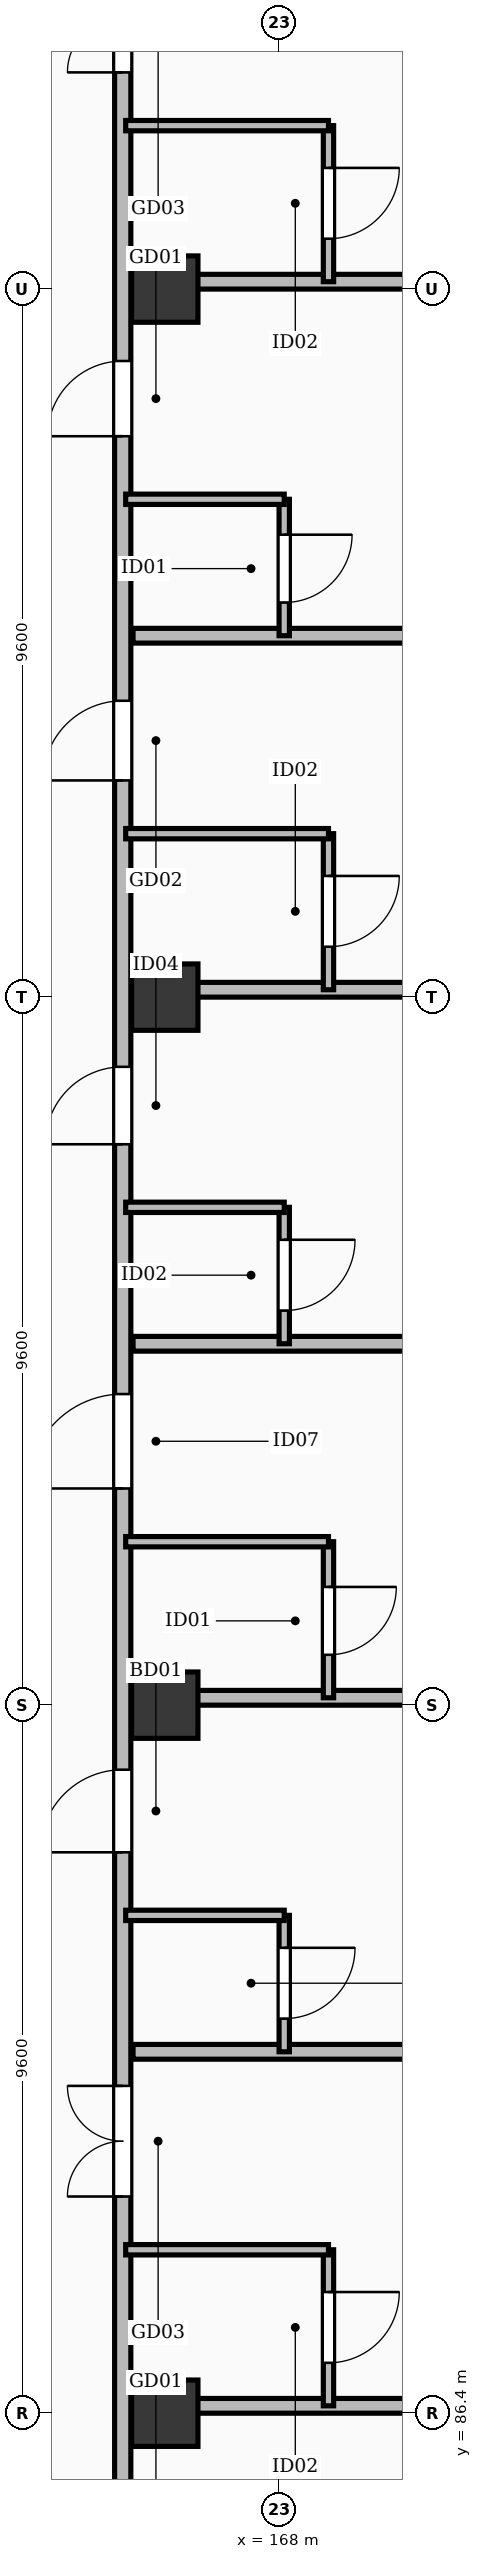
"""IFC4 building model, lengths in metres.
Left out: names, types, materials, properties, quantities, classifications, styles, units other than length and angle.
Written with IfcOpenShell. Run it as: python <this file> out.ifc"""

import sys

from ifc_helpers import new_model, si_unit, direction, frame, frame_2d, origin, origin_2d, place, context, subcontext, project, spatial, rectangle, extrude, element, fill, save


model = new_model("IFC4")
c1 = context("Model", 3, precision=1e-05, world=origin(), true_north=direction((0.0, 1.0)))
c2 = subcontext(c1, "Body", "Model", "MODEL_VIEW")
j1 = project(units=[si_unit("LENGTHUNIT", "METRE"), si_unit("PLANEANGLEUNIT", "RADIAN")], contexts=[c1])
p1 = place(None, origin())
s1 = spatial("IfcSite", under=j1, at=p1, CompositionType="ELEMENT")
p2 = place(p1, origin())
s2 = spatial("IfcBuilding", under=s1, at=p2, CompositionType="ELEMENT")
p3 = place(p2, frame((0.0, 0.0, 16.2)))
s3 = spatial("IfcBuildingStorey", under=s2, at=p3, CompositionType="ELEMENT", Elevation=16.2)
for number, where, z_axis, x_axis in (
    (1, (166.45, 86.4, 0.0), (0.0, 0.0, 1.0), (1.0, 0.0, 0.0)),
    (2, (166.45, 96.0, 0.0), (0.0, 0.0, 1.0), (1.0, 0.0, 0.0)),
    (3, (166.45, 105.6, 0.0), (0.0, 0.0, 1.0), (1.0, 0.0, 0.0)),
    (4, (166.45, 115.2, 0.0), (0.0, 0.0, 1.0), (1.0, 0.0, 0.0)),
):
    element("IfcColumn", number, at=place(p3, frame(where, z_axis=z_axis, x_axis=x_axis)), inside=s3, PredefinedType="COLUMN", context=c2, shape_type="SweptSolid", body=[
        extrude(rectangle(XDim=0.9, YDim=0.9, at=origin_2d()), origin(), (0.0, 0.0, 1.0), 4.8),
    ])
p4 = place(p3, frame((165.88, 65.4, 0.0), z_axis=(0.0, 0.0, 1.0), x_axis=(0.0, 1.0, 0.0)))
e5 = element("IfcWall", 5, at=p4, inside=s3, PredefinedType="PARTITIONING", context=c2, shape_type="SweptSolid", body=[
    extrude(rectangle(XDim=60.25, YDim=0.22, at=frame_2d((30.125, 0.0))), origin(), (0.0, 0.0, 1.0), 3.732),
])
p5 = place(p4, frame((4.738, 0.0, 0.0)))
e6 = element("IfcOpeningElement", 6, at=p5, cuts=e5, PredefinedType="OPENING", context=c2, shape_type="SweptSolid", body=[
    extrude(rectangle(XDim=1.28, YDim=2.16, at=frame_2d((0.64, 1.08))), frame((0.0, 0.122, 0.0), z_axis=(0.0, -1.0, 0.0), x_axis=(1.0, 0.0, 0.0)), (0.0, 0.0, 1.0), 0.244),
])
p6 = place(p4, frame((9.405, 0.0, 0.0)))
e7 = element("IfcOpeningElement", 7, at=p6, cuts=e5, PredefinedType="OPENING", context=c2, shape_type="SweptSolid", body=[
    extrude(rectangle(XDim=1.05, YDim=2.18, at=frame_2d((0.525, 1.09))), frame((0.0, 0.122, 0.0), z_axis=(0.0, -1.0, 0.0), x_axis=(1.0, 0.0, 0.0)), (0.0, 0.0, 1.0), 0.244),
])
p7 = place(p4, frame((14.338, 0.0, 0.0)))
e8 = element("IfcOpeningElement", 8, at=p7, cuts=e5, PredefinedType="OPENING", context=c2, shape_type="SweptSolid", body=[
    extrude(rectangle(XDim=1.08, YDim=2.25, at=frame_2d((0.54, 1.125))), frame((0.0, 0.122, 0.0), z_axis=(0.0, -1.0, 0.0), x_axis=(1.0, 0.0, 0.0)), (0.0, 0.0, 1.0), 0.244),
])
p8 = place(p4, frame((19.005, 0.0, 0.0)))
e9 = element("IfcOpeningElement", 9, at=p8, cuts=e5, PredefinedType="OPENING", context=c2, shape_type="SweptSolid", body=[
    extrude(rectangle(XDim=1.02, YDim=2.2, at=frame_2d((0.51, 1.1))), frame((0.0, 0.122, 0.0), z_axis=(0.0, -1.0, 0.0), x_axis=(1.0, 0.0, 0.0)), (0.0, 0.0, 1.0), 0.244),
])
p9 = place(p4, frame((23.938, 0.0, 0.0)))
e10 = element("IfcOpeningElement", 10, at=p9, cuts=e5, PredefinedType="OPENING", context=c2, shape_type="SweptSolid", body=[
    extrude(rectangle(XDim=1.5, YDim=2.3, at=frame_2d((0.75, 1.15))), frame((0.0, 0.122, 0.0), z_axis=(0.0, -1.0, 0.0), x_axis=(1.0, 0.0, 0.0)), (0.0, 0.0, 1.0), 0.244),
])
p10 = place(p4, frame((28.605, 0.0, 0.0)))
e11 = element("IfcOpeningElement", 11, at=p10, cuts=e5, PredefinedType="OPENING", context=c2, shape_type="SweptSolid", body=[
    extrude(rectangle(XDim=1.12, YDim=2.15, at=frame_2d((0.56, 1.075))), frame((0.0, 0.122, 0.0), z_axis=(0.0, -1.0, 0.0), x_axis=(1.0, 0.0, 0.0)), (0.0, 0.0, 1.0), 0.244),
])
p11 = place(p4, frame((33.538, 0.0, 0.0)))
e12 = element("IfcOpeningElement", 12, at=p11, cuts=e5, PredefinedType="OPENING", context=c2, shape_type="SweptSolid", body=[
    extrude(rectangle(XDim=1.28, YDim=2.16, at=frame_2d((0.64, 1.08))), frame((0.0, 0.122, 0.0), z_axis=(0.0, -1.0, 0.0), x_axis=(1.0, 0.0, 0.0)), (0.0, 0.0, 1.0), 0.244),
])
p12 = place(p4, frame((38.205, 0.0, 0.0)))
e13 = element("IfcOpeningElement", 13, at=p12, cuts=e5, PredefinedType="OPENING", context=c2, shape_type="SweptSolid", body=[
    extrude(rectangle(XDim=1.05, YDim=2.18, at=frame_2d((0.525, 1.09))), frame((0.0, 0.122, 0.0), z_axis=(0.0, -1.0, 0.0), x_axis=(1.0, 0.0, 0.0)), (0.0, 0.0, 1.0), 0.244),
])
p13 = place(p4, frame((43.138, 0.0, 0.0)))
e14 = element("IfcOpeningElement", 14, at=p13, cuts=e5, PredefinedType="OPENING", context=c2, shape_type="SweptSolid", body=[
    extrude(rectangle(XDim=1.08, YDim=2.25, at=frame_2d((0.54, 1.125))), frame((0.0, 0.122, 0.0), z_axis=(0.0, -1.0, 0.0), x_axis=(1.0, 0.0, 0.0)), (0.0, 0.0, 1.0), 0.244),
])
p14 = place(p4, frame((47.805, 0.0, 0.0)))
e15 = element("IfcOpeningElement", 15, at=p14, cuts=e5, PredefinedType="OPENING", context=c2, shape_type="SweptSolid", body=[
    extrude(rectangle(XDim=1.02, YDim=2.2, at=frame_2d((0.51, 1.1))), frame((0.0, 0.122, 0.0), z_axis=(0.0, -1.0, 0.0), x_axis=(1.0, 0.0, 0.0)), (0.0, 0.0, 1.0), 0.244),
])
p15 = place(p4, frame((52.738, 0.0, 0.0)))
e16 = element("IfcOpeningElement", 16, at=p15, cuts=e5, PredefinedType="OPENING", context=c2, shape_type="SweptSolid", body=[
    extrude(rectangle(XDim=1.5, YDim=2.3, at=frame_2d((0.75, 1.15))), frame((0.0, 0.122, 0.0), z_axis=(0.0, -1.0, 0.0), x_axis=(1.0, 0.0, 0.0)), (0.0, 0.0, 1.0), 0.244),
])
p16 = place(p4, frame((57.405, 0.0, 0.0)))
e17 = element("IfcOpeningElement", 17, at=p16, cuts=e5, PredefinedType="OPENING", context=c2, shape_type="SweptSolid", body=[
    extrude(rectangle(XDim=1.12, YDim=2.15, at=frame_2d((0.56, 1.075))), frame((0.0, 0.122, 0.0), z_axis=(0.0, -1.0, 0.0), x_axis=(1.0, 0.0, 0.0)), (0.0, 0.0, 1.0), 0.244),
])
p17 = place(p3, frame((166.02, 86.5, 0.0), z_axis=(0.0, 0.0, 1.0), x_axis=(1.0, 0.0, 0.0)))
e18 = element("IfcWall", 18, at=p17, inside=s3, PredefinedType="PARTITIONING", context=c2, shape_type="SweptSolid", body=[
    extrude(rectangle(XDim=13.23, YDim=0.2, at=frame_2d((6.615, 0.0))), origin(), (0.0, 0.0, 1.0), 3.032),
])
p18 = place(p3, frame((168.67, 86.5, 0.0), z_axis=(0.0, 0.0, 1.0), x_axis=(0.0, 1.0, 0.0)))
e19 = element("IfcWall", 19, at=p18, inside=s3, PredefinedType="PARTITIONING", context=c2, shape_type="SweptSolid", body=[
    extrude(rectangle(XDim=2.116, YDim=0.14, at=frame_2d((1.058, 0.0))), origin(), (0.0, 0.0, 1.0), 3.732),
])
p19 = place(p18, frame((0.583, 0.0, 0.0)))
e20 = element("IfcOpeningElement", 20, at=p19, cuts=e19, PredefinedType="OPENING", context=c2, shape_type="SweptSolid", body=[
    extrude(rectangle(XDim=0.96, YDim=2.12, at=frame_2d((0.48, 1.06))), frame((0.0, 0.082, 0.0), z_axis=(0.0, -1.0, 0.0), x_axis=(1.0, 0.0, 0.0)), (0.0, 0.0, 1.0), 0.164),
])
p20 = place(p3, frame((165.92, 88.616, 0.0), z_axis=(0.0, 0.0, 1.0), x_axis=(1.0, 0.0, 0.0)))
e21 = element("IfcWall", 21, at=p20, inside=s3, PredefinedType="PARTITIONING", context=c2, shape_type="SweptSolid", body=[
    extrude(rectangle(XDim=2.75, YDim=0.14, at=frame_2d((1.375, 0.0))), origin(), (0.0, 0.0, 1.0), 3.132),
])
p21 = place(p3, frame((166.02, 91.3, 0.0), z_axis=(0.0, 0.0, 1.0), x_axis=(1.0, 0.0, 0.0)))
e22 = element("IfcWall", 22, at=p21, inside=s3, PredefinedType="PARTITIONING", context=c2, shape_type="SweptSolid", body=[
    extrude(rectangle(XDim=13.23, YDim=0.2, at=frame_2d((6.615, 0.0))), origin(), (0.0, 0.0, 1.0), 3.032),
])
p22 = place(p3, frame((168.07, 91.3, 0.0), z_axis=(0.0, 0.0, 1.0), x_axis=(0.0, 1.0, 0.0)))
e23 = element("IfcWall", 23, at=p22, inside=s3, PredefinedType="PARTITIONING", context=c2, shape_type="SweptSolid", body=[
    extrude(rectangle(XDim=1.85, YDim=0.14, at=frame_2d((0.925, 0.0))), origin(), (0.0, 0.0, 1.0), 4.54),
])
p23 = place(p22, frame((0.45, 0.0, 0.0)))
e24 = element("IfcOpeningElement", 24, at=p23, cuts=e23, PredefinedType="OPENING", context=c2, shape_type="SweptSolid", body=[
    extrude(rectangle(XDim=0.96, YDim=2.12, at=frame_2d((0.48, 1.06))), frame((0.0, 0.082, 0.0), z_axis=(0.0, -1.0, 0.0), x_axis=(1.0, 0.0, 0.0)), (0.0, 0.0, 1.0), 0.164),
])
p24 = place(p3, frame((165.92, 93.15, 0.0), z_axis=(0.0, 0.0, 1.0), x_axis=(1.0, 0.0, 0.0)))
e25 = element("IfcWall", 25, at=p24, inside=s3, PredefinedType="PARTITIONING", context=c2, shape_type="SweptSolid", body=[
    extrude(rectangle(XDim=2.15, YDim=0.14, at=frame_2d((1.075, 0.0))), origin(), (0.0, 0.0, 1.0), 3.132),
])
p25 = place(p3, frame((166.02, 96.1, 0.0), z_axis=(0.0, 0.0, 1.0), x_axis=(1.0, 0.0, 0.0)))
e26 = element("IfcWall", 26, at=p25, inside=s3, PredefinedType="PARTITIONING", context=c2, shape_type="SweptSolid", body=[
    extrude(rectangle(XDim=13.23, YDim=0.2, at=frame_2d((6.615, 0.0))), origin(), (0.0, 0.0, 1.0), 3.032),
])
p26 = place(p3, frame((168.67, 96.1, 0.0), z_axis=(0.0, 0.0, 1.0), x_axis=(0.0, 1.0, 0.0)))
e27 = element("IfcWall", 27, at=p26, inside=s3, PredefinedType="PARTITIONING", context=c2, shape_type="SweptSolid", body=[
    extrude(rectangle(XDim=2.116, YDim=0.14, at=frame_2d((1.058, 0.0))), origin(), (0.0, 0.0, 1.0), 3.732),
])
p27 = place(p26, frame((0.583, 0.0, 0.0)))
e28 = element("IfcOpeningElement", 28, at=p27, cuts=e27, PredefinedType="OPENING", context=c2, shape_type="SweptSolid", body=[
    extrude(rectangle(XDim=0.92, YDim=2.1, at=frame_2d((0.46, 1.05))), frame((0.0, 0.082, 0.0), z_axis=(0.0, -1.0, 0.0), x_axis=(1.0, 0.0, 0.0)), (0.0, 0.0, 1.0), 0.164),
])
p28 = place(p3, frame((165.92, 98.216, 0.0), z_axis=(0.0, 0.0, 1.0), x_axis=(1.0, 0.0, 0.0)))
e29 = element("IfcWall", 29, at=p28, inside=s3, PredefinedType="PARTITIONING", context=c2, shape_type="SweptSolid", body=[
    extrude(rectangle(XDim=2.75, YDim=0.14, at=frame_2d((1.375, 0.0))), origin(), (0.0, 0.0, 1.0), 3.132),
])
p29 = place(p3, frame((166.02, 100.9, 0.0), z_axis=(0.0, 0.0, 1.0), x_axis=(1.0, 0.0, 0.0)))
e30 = element("IfcWall", 30, at=p29, inside=s3, PredefinedType="PARTITIONING", context=c2, shape_type="SweptSolid", body=[
    extrude(rectangle(XDim=13.23, YDim=0.2, at=frame_2d((6.615, 0.0))), origin(), (0.0, 0.0, 1.0), 3.032),
])
p30 = place(p3, frame((168.07, 100.9, 0.0), z_axis=(0.0, 0.0, 1.0), x_axis=(0.0, 1.0, 0.0)))
e31 = element("IfcWall", 31, at=p30, inside=s3, PredefinedType="PARTITIONING", context=c2, shape_type="SweptSolid", body=[
    extrude(rectangle(XDim=1.85, YDim=0.14, at=frame_2d((0.925, 0.0))), origin(), (0.0, 0.0, 1.0), 4.54),
])
p31 = place(p30, frame((0.45, 0.0, 0.0)))
e32 = element("IfcOpeningElement", 32, at=p31, cuts=e31, PredefinedType="OPENING", context=c2, shape_type="SweptSolid", body=[
    extrude(rectangle(XDim=0.96, YDim=2.12, at=frame_2d((0.48, 1.06))), frame((0.0, 0.082, 0.0), z_axis=(0.0, -1.0, 0.0), x_axis=(1.0, 0.0, 0.0)), (0.0, 0.0, 1.0), 0.164),
])
p32 = place(p3, frame((165.92, 102.75, 0.0), z_axis=(0.0, 0.0, 1.0), x_axis=(1.0, 0.0, 0.0)))
e33 = element("IfcWall", 33, at=p32, inside=s3, PredefinedType="PARTITIONING", context=c2, shape_type="SweptSolid", body=[
    extrude(rectangle(XDim=2.15, YDim=0.14, at=frame_2d((1.075, 0.0))), origin(), (0.0, 0.0, 1.0), 3.132),
])
p33 = place(p3, frame((166.02, 105.7, 0.0), z_axis=(0.0, 0.0, 1.0), x_axis=(1.0, 0.0, 0.0)))
e34 = element("IfcWall", 34, at=p33, inside=s3, PredefinedType="PARTITIONING", context=c2, shape_type="SweptSolid", body=[
    extrude(rectangle(XDim=13.23, YDim=0.2, at=frame_2d((6.615, 0.0))), origin(), (0.0, 0.0, 1.0), 3.032),
])
p34 = place(p3, frame((168.67, 105.7, 0.0), z_axis=(0.0, 0.0, 1.0), x_axis=(0.0, 1.0, 0.0)))
e35 = element("IfcWall", 35, at=p34, inside=s3, PredefinedType="PARTITIONING", context=c2, shape_type="SweptSolid", body=[
    extrude(rectangle(XDim=2.116, YDim=0.14, at=frame_2d((1.058, 0.0))), origin(), (0.0, 0.0, 1.0), 3.732),
])
p35 = place(p34, frame((0.583, 0.0, 0.0)))
e36 = element("IfcOpeningElement", 36, at=p35, cuts=e35, PredefinedType="OPENING", context=c2, shape_type="SweptSolid", body=[
    extrude(rectangle(XDim=0.96, YDim=2.12, at=frame_2d((0.48, 1.06))), frame((0.0, 0.082, 0.0), z_axis=(0.0, -1.0, 0.0), x_axis=(1.0, 0.0, 0.0)), (0.0, 0.0, 1.0), 0.164),
])
p36 = place(p3, frame((165.92, 107.816, 0.0), z_axis=(0.0, 0.0, 1.0), x_axis=(1.0, 0.0, 0.0)))
e37 = element("IfcWall", 37, at=p36, inside=s3, PredefinedType="PARTITIONING", context=c2, shape_type="SweptSolid", body=[
    extrude(rectangle(XDim=2.75, YDim=0.14, at=frame_2d((1.375, 0.0))), origin(), (0.0, 0.0, 1.0), 3.132),
])
p37 = place(p3, frame((166.02, 110.5, 0.0), z_axis=(0.0, 0.0, 1.0), x_axis=(1.0, 0.0, 0.0)))
e38 = element("IfcWall", 38, at=p37, inside=s3, PredefinedType="PARTITIONING", context=c2, shape_type="SweptSolid", body=[
    extrude(rectangle(XDim=13.23, YDim=0.2, at=frame_2d((6.615, 0.0))), origin(), (0.0, 0.0, 1.0), 3.032),
])
p38 = place(p3, frame((168.07, 110.5, 0.0), z_axis=(0.0, 0.0, 1.0), x_axis=(0.0, 1.0, 0.0)))
e39 = element("IfcWall", 39, at=p38, inside=s3, PredefinedType="PARTITIONING", context=c2, shape_type="SweptSolid", body=[
    extrude(rectangle(XDim=1.85, YDim=0.14, at=frame_2d((0.925, 0.0))), origin(), (0.0, 0.0, 1.0), 4.54),
])
p39 = place(p38, frame((0.45, 0.0, 0.0)))
e40 = element("IfcOpeningElement", 40, at=p39, cuts=e39, PredefinedType="OPENING", context=c2, shape_type="SweptSolid", body=[
    extrude(rectangle(XDim=0.92, YDim=2.1, at=frame_2d((0.46, 1.05))), frame((0.0, 0.082, 0.0), z_axis=(0.0, -1.0, 0.0), x_axis=(1.0, 0.0, 0.0)), (0.0, 0.0, 1.0), 0.164),
])
p40 = place(p3, frame((165.92, 112.35, 0.0), z_axis=(0.0, 0.0, 1.0), x_axis=(1.0, 0.0, 0.0)))
e41 = element("IfcWall", 41, at=p40, inside=s3, PredefinedType="PARTITIONING", context=c2, shape_type="SweptSolid", body=[
    extrude(rectangle(XDim=2.15, YDim=0.14, at=frame_2d((1.075, 0.0))), origin(), (0.0, 0.0, 1.0), 3.132),
])
p41 = place(p3, frame((166.02, 115.3, 0.0), z_axis=(0.0, 0.0, 1.0), x_axis=(1.0, 0.0, 0.0)))
e42 = element("IfcWall", 42, at=p41, inside=s3, PredefinedType="PARTITIONING", context=c2, shape_type="SweptSolid", body=[
    extrude(rectangle(XDim=13.23, YDim=0.2, at=frame_2d((6.615, 0.0))), origin(), (0.0, 0.0, 1.0), 3.032),
])
p42 = place(p3, frame((168.67, 115.3, 0.0), z_axis=(0.0, 0.0, 1.0), x_axis=(0.0, 1.0, 0.0)))
e43 = element("IfcWall", 43, at=p42, inside=s3, PredefinedType="PARTITIONING", context=c2, shape_type="SweptSolid", body=[
    extrude(rectangle(XDim=2.116, YDim=0.14, at=frame_2d((1.058, 0.0))), origin(), (0.0, 0.0, 1.0), 3.732),
])
p43 = place(p42, frame((0.583, 0.0, 0.0)))
e44 = element("IfcOpeningElement", 44, at=p43, cuts=e43, PredefinedType="OPENING", context=c2, shape_type="SweptSolid", body=[
    extrude(rectangle(XDim=0.96, YDim=2.12, at=frame_2d((0.48, 1.06))), frame((0.0, 0.082, 0.0), z_axis=(0.0, -1.0, 0.0), x_axis=(1.0, 0.0, 0.0)), (0.0, 0.0, 1.0), 0.164),
])
p44 = place(p3, frame((165.92, 117.416, 0.0), z_axis=(0.0, 0.0, 1.0), x_axis=(1.0, 0.0, 0.0)))
e45 = element("IfcWall", 45, at=p44, inside=s3, PredefinedType="PARTITIONING", context=c2, shape_type="SweptSolid", body=[
    extrude(rectangle(XDim=2.75, YDim=0.14, at=frame_2d((1.375, 0.0))), origin(), (0.0, 0.0, 1.0), 3.132),
])
p45 = place(p9, origin())
e46 = element("IfcDoor", 46, at=p45, inside=s3, OperationType="DOUBLE_DOOR_SINGLE_SWING", PredefinedType="DOOR", context=c2, shape_type="SweptSolid", body=[
    extrude(rectangle(XDim=1.5, YDim=2.3, at=frame_2d((0.75, 1.15))), frame((0.0, 0.025, 0.0), z_axis=(0.0, -1.0, 0.0), x_axis=(1.0, 0.0, 0.0)), (0.0, 0.0, 1.0), 0.05),
])
fill(e10, e46)
p46 = place(p19, frame((0.96, 0.0, 0.0), z_axis=(0.0, 0.0, 1.0), x_axis=(-1.0, 0.0, 0.0)))
e47 = element("IfcDoor", 47, at=p46, inside=s3, OperationType="SINGLE_SWING_RIGHT", PredefinedType="DOOR", context=c2, shape_type="SweptSolid", body=[
    extrude(rectangle(XDim=0.96, YDim=2.12, at=frame_2d((0.48, 1.06))), frame((0.0, 0.025, 0.0), z_axis=(0.0, -1.0, 0.0), x_axis=(1.0, 0.0, 0.0)), (0.0, 0.0, 1.0), 0.05),
])
fill(e20, e47)
p47 = place(p10, origin())
e48 = element("IfcDoor", 48, at=p47, inside=s3, OperationType="SINGLE_SWING_LEFT", PredefinedType="DOOR", context=c2, shape_type="SweptSolid", body=[
    extrude(rectangle(XDim=1.12, YDim=2.15, at=frame_2d((0.56, 1.075))), frame((0.0, 0.025, 0.0), z_axis=(0.0, -1.0, 0.0), x_axis=(1.0, 0.0, 0.0)), (0.0, 0.0, 1.0), 0.05),
])
fill(e11, e48)
p48 = place(p23, frame((0.96, 0.0, 0.0), z_axis=(0.0, 0.0, 1.0), x_axis=(-1.0, 0.0, 0.0)))
e49 = element("IfcDoor", 49, at=p48, inside=s3, OperationType="SINGLE_SWING_RIGHT", PredefinedType="DOOR", context=c2, shape_type="SweptSolid", body=[
    extrude(rectangle(XDim=0.96, YDim=2.12, at=frame_2d((0.48, 1.06))), frame((0.0, 0.025, 0.0), z_axis=(0.0, -1.0, 0.0), x_axis=(1.0, 0.0, 0.0)), (0.0, 0.0, 1.0), 0.05),
])
fill(e24, e49)
p49 = place(p11, origin())
e50 = element("IfcDoor", 50, at=p49, inside=s3, OperationType="SINGLE_SWING_LEFT", PredefinedType="DOOR", context=c2, shape_type="SweptSolid", body=[
    extrude(rectangle(XDim=1.28, YDim=2.16, at=frame_2d((0.64, 1.08))), frame((0.0, 0.025, 0.0), z_axis=(0.0, -1.0, 0.0), x_axis=(1.0, 0.0, 0.0)), (0.0, 0.0, 1.0), 0.05),
])
fill(e12, e50)
p50 = place(p27, frame((0.92, 0.0, 0.0), z_axis=(0.0, 0.0, 1.0), x_axis=(-1.0, 0.0, 0.0)))
e51 = element("IfcDoor", 51, at=p50, inside=s3, OperationType="SINGLE_SWING_RIGHT", PredefinedType="DOOR", context=c2, shape_type="SweptSolid", body=[
    extrude(rectangle(XDim=0.92, YDim=2.1, at=frame_2d((0.46, 1.05))), frame((0.0, 0.025, 0.0), z_axis=(0.0, -1.0, 0.0), x_axis=(1.0, 0.0, 0.0)), (0.0, 0.0, 1.0), 0.05),
])
fill(e28, e51)
p51 = place(p12, origin())
e52 = element("IfcDoor", 52, at=p51, inside=s3, OperationType="SINGLE_SWING_LEFT", PredefinedType="DOOR", context=c2, shape_type="SweptSolid", body=[
    extrude(rectangle(XDim=1.05, YDim=2.18, at=frame_2d((0.525, 1.09))), frame((0.0, 0.025, 0.0), z_axis=(0.0, -1.0, 0.0), x_axis=(1.0, 0.0, 0.0)), (0.0, 0.0, 1.0), 0.05),
])
fill(e13, e52)
p52 = place(p31, frame((0.96, 0.0, 0.0), z_axis=(0.0, 0.0, 1.0), x_axis=(-1.0, 0.0, 0.0)))
e53 = element("IfcDoor", 53, at=p52, inside=s3, OperationType="SINGLE_SWING_RIGHT", PredefinedType="DOOR", context=c2, shape_type="SweptSolid", body=[
    extrude(rectangle(XDim=0.96, YDim=2.12, at=frame_2d((0.48, 1.06))), frame((0.0, 0.025, 0.0), z_axis=(0.0, -1.0, 0.0), x_axis=(1.0, 0.0, 0.0)), (0.0, 0.0, 1.0), 0.05),
])
fill(e32, e53)
p53 = place(p13, origin())
e54 = element("IfcDoor", 54, at=p53, inside=s3, OperationType="SINGLE_SWING_LEFT", PredefinedType="DOOR", context=c2, shape_type="SweptSolid", body=[
    extrude(rectangle(XDim=1.08, YDim=2.25, at=frame_2d((0.54, 1.125))), frame((0.0, 0.025, 0.0), z_axis=(0.0, -1.0, 0.0), x_axis=(1.0, 0.0, 0.0)), (0.0, 0.0, 1.0), 0.05),
])
fill(e14, e54)
p54 = place(p35, frame((0.96, 0.0, 0.0), z_axis=(0.0, 0.0, 1.0), x_axis=(-1.0, 0.0, 0.0)))
e55 = element("IfcDoor", 55, at=p54, inside=s3, OperationType="SINGLE_SWING_RIGHT", PredefinedType="DOOR", context=c2, shape_type="SweptSolid", body=[
    extrude(rectangle(XDim=0.96, YDim=2.12, at=frame_2d((0.48, 1.06))), frame((0.0, 0.025, 0.0), z_axis=(0.0, -1.0, 0.0), x_axis=(1.0, 0.0, 0.0)), (0.0, 0.0, 1.0), 0.05),
])
fill(e36, e55)
p55 = place(p14, origin())
e56 = element("IfcDoor", 56, at=p55, inside=s3, OperationType="SINGLE_SWING_LEFT", PredefinedType="DOOR", context=c2, shape_type="SweptSolid", body=[
    extrude(rectangle(XDim=1.02, YDim=2.2, at=frame_2d((0.51, 1.1))), frame((0.0, 0.025, 0.0), z_axis=(0.0, -1.0, 0.0), x_axis=(1.0, 0.0, 0.0)), (0.0, 0.0, 1.0), 0.05),
])
fill(e15, e56)
p56 = place(p39, frame((0.92, 0.0, 0.0), z_axis=(0.0, 0.0, 1.0), x_axis=(-1.0, 0.0, 0.0)))
e57 = element("IfcDoor", 57, at=p56, inside=s3, OperationType="SINGLE_SWING_RIGHT", PredefinedType="DOOR", context=c2, shape_type="SweptSolid", body=[
    extrude(rectangle(XDim=0.92, YDim=2.1, at=frame_2d((0.46, 1.05))), frame((0.0, 0.025, 0.0), z_axis=(0.0, -1.0, 0.0), x_axis=(1.0, 0.0, 0.0)), (0.0, 0.0, 1.0), 0.05),
])
fill(e40, e57)
p57 = place(p15, origin())
e58 = element("IfcDoor", 58, at=p57, inside=s3, OperationType="DOUBLE_DOOR_SINGLE_SWING", PredefinedType="DOOR", context=c2, shape_type="SweptSolid", body=[
    extrude(rectangle(XDim=1.5, YDim=2.3, at=frame_2d((0.75, 1.15))), frame((0.0, 0.025, 0.0), z_axis=(0.0, -1.0, 0.0), x_axis=(1.0, 0.0, 0.0)), (0.0, 0.0, 1.0), 0.05),
])
fill(e16, e58)
p58 = place(p43, frame((0.96, 0.0, 0.0), z_axis=(0.0, 0.0, 1.0), x_axis=(-1.0, 0.0, 0.0)))
e59 = element("IfcDoor", 59, at=p58, inside=s3, OperationType="SINGLE_SWING_RIGHT", PredefinedType="DOOR", context=c2, shape_type="SweptSolid", body=[
    extrude(rectangle(XDim=0.96, YDim=2.12, at=frame_2d((0.48, 1.06))), frame((0.0, 0.025, 0.0), z_axis=(0.0, -1.0, 0.0), x_axis=(1.0, 0.0, 0.0)), (0.0, 0.0, 1.0), 0.05),
])
fill(e44, e59)
save(model, sys.argv[1])
